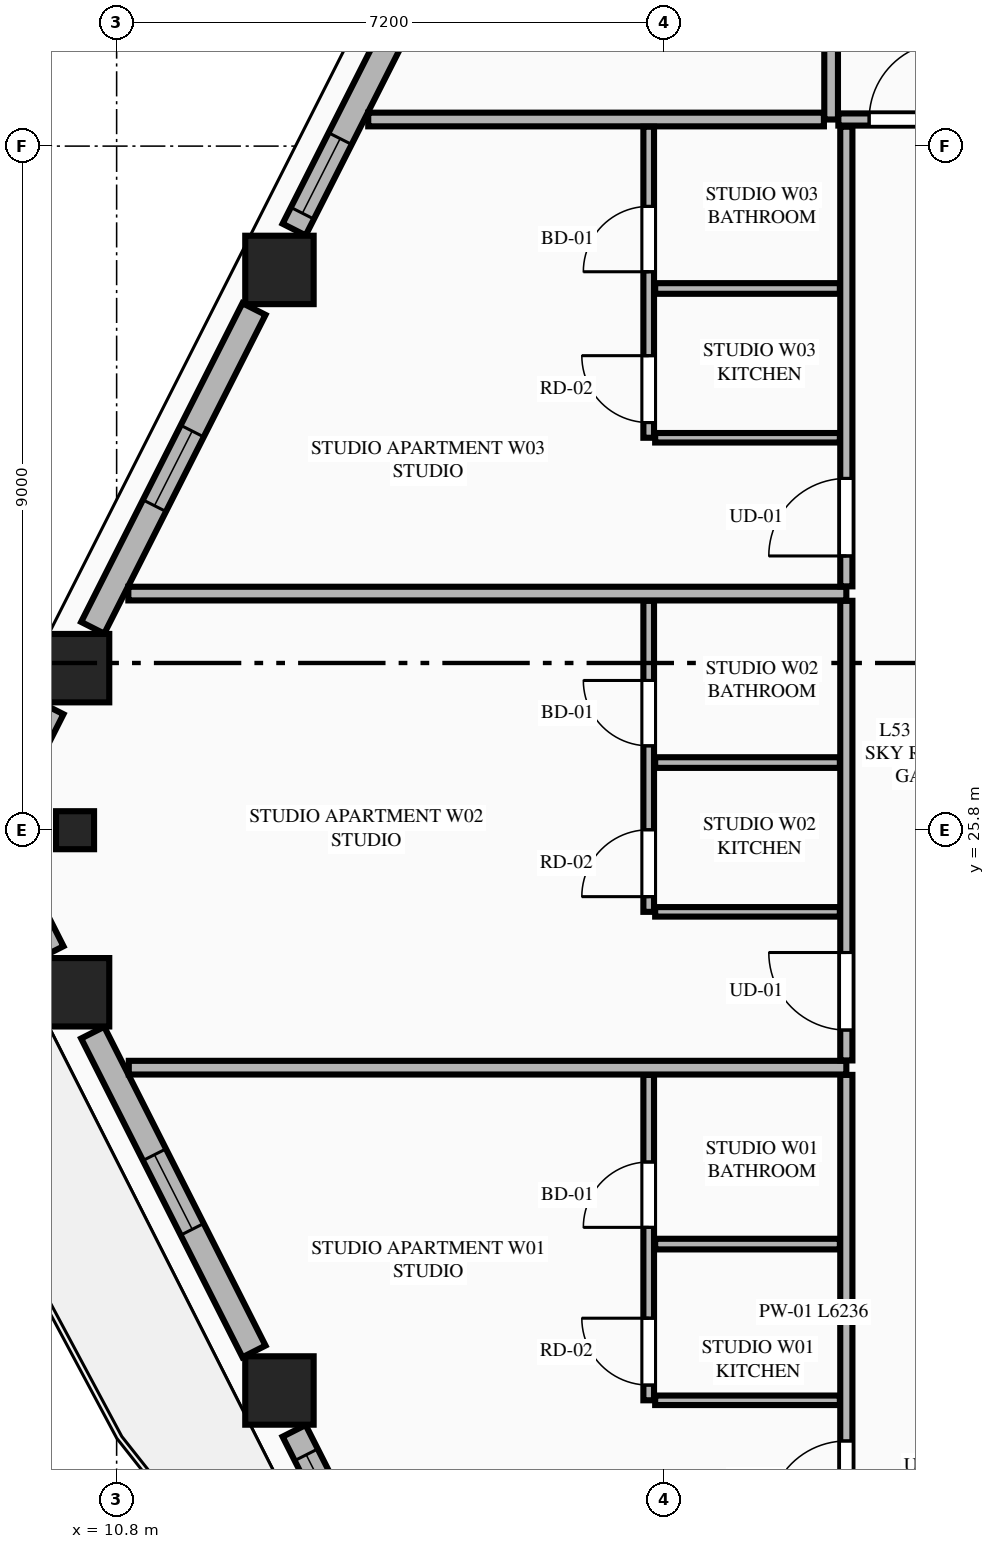
"""IFC4 building model, lengths in metres.
Left out: names, types, materials, properties, quantities, classifications, styles, units other than length and angle.
Written with IfcOpenShell. Run it as: python <this file> out.ifc"""

import sys

from ifc_helpers import new_model, si_unit, direction, frame, frame_2d, origin, origin_2d, place, context, subcontext, project, spatial, rectangle, extrude, element, fill, save


model = new_model("IFC4")
c1 = context("Model", 3, precision=1e-05, world=origin(), true_north=direction((0.0, 1.0)))
c2 = subcontext(c1, "Body", "Model", "MODEL_VIEW")
j1 = project(units=[si_unit("LENGTHUNIT", "METRE"), si_unit("PLANEANGLEUNIT", "RADIAN")], contexts=[c1])
p1 = place(None, origin())
s1 = spatial("IfcSite", under=j1, at=p1, CompositionType="ELEMENT")
p2 = place(p1, origin())
s2 = spatial("IfcBuilding", under=s1, at=p2, CompositionType="ELEMENT")
p3 = place(p2, frame((0.0, 0.0, 200.3)))
s3 = spatial("IfcBuildingStorey", under=s2, at=p3, CompositionType="ELEMENT", Elevation=200.3)
for number, where, z_axis, x_axis in (
    (1, (12.942, 33.171, 0.0), (0.0, 0.0, 1.0), (1.0, 0.0, 0.0)),
    (2, (10.253, 27.932, 0.0), (0.0, 0.0, 1.0), (1.0, 0.0, 0.0)),
    (3, (10.253, 23.668, 0.0), (0.0, 0.0, 1.0), (1.0, 0.0, 0.0)),
    (4, (12.942, 18.429, 0.0), (0.0, 0.0, 1.0), (1.0, 0.0, 0.0)),
):
    element("IfcColumn", number, at=place(p3, frame(where, z_axis=z_axis, x_axis=x_axis)), inside=s3, PredefinedType="COLUMN", context=c2, shape_type="SweptSolid", body=[
        extrude(rectangle(XDim=0.9, YDim=0.9, at=origin_2d()), origin(), (0.0, 0.0, 1.0), 3.55),
    ])
p4 = place(p3, frame((10.253, 25.8, 0.0), z_axis=(0.0, 0.0, 1.0), x_axis=(0.0, -1.0, 0.0)))
e5 = element("IfcColumn", 5, at=p4, inside=s3, PredefinedType="PILASTER", context=c2, shape_type="SweptSolid", body=[
    extrude(rectangle(XDim=0.5, YDim=0.35, at=origin_2d()), origin(), (0.0, 0.0, 1.0), 3.55),
])
p5 = place(p3, frame((15.352, 38.083, 0.0), z_axis=(0.0, 0.0, 1.0), x_axis=(-0.451524246964, -0.89225884944, 0.0)))
e6 = element("IfcWall", 6, at=p5, inside=s3, PredefinedType="STANDARD", context=c2, shape_type="SweptSolid", body=[
    extrude(rectangle(XDim=4.91, YDim=0.34, at=frame_2d((2.455, 0.0))), origin(), (0.0, 0.0, 1.0), 2.883),
])
p6 = place(p5, frame((0.963, 0.0, 0.75)))
e7 = element("IfcOpeningElement", 7, at=p6, cuts=e6, PredefinedType="OPENING", context=c2, shape_type="SweptSolid", body=[
    extrude(rectangle(XDim=1.1, YDim=1.983, at=frame_2d((0.55, 0.991))), frame((0.0, 0.18, 0.0), z_axis=(0.0, -1.0, 0.0), x_axis=(1.0, 0.0, 0.0)), (0.0, 0.0, 1.0), 0.36),
])
p7 = place(p5, frame((3.569, 0.0, 0.75)))
e8 = element("IfcOpeningElement", 8, at=p7, cuts=e6, PredefinedType="OPENING", context=c2, shape_type="SweptSolid", body=[
    extrude(rectangle(XDim=1.1, YDim=1.983, at=frame_2d((0.55, 0.991))), frame((0.0, 0.18, 0.0), z_axis=(0.0, -1.0, 0.0), x_axis=(1.0, 0.0, 0.0)), (0.0, 0.0, 1.0), 0.36),
])
p8 = place(p3, frame((12.607, 32.657, 0.0), z_axis=(0.0, 0.0, 1.0), x_axis=(-0.451426298588, -0.892308409096, 0.0)))
e9 = element("IfcWall", 9, at=p8, inside=s3, PredefinedType="STANDARD", context=c2, shape_type="SweptSolid", body=[
    extrude(rectangle(XDim=4.7, YDim=0.34, at=frame_2d((2.35, 0.0))), origin(), (0.0, 0.0, 1.0), 2.883),
])
p9 = place(p8, frame((1.8, 0.0, 0.75)))
e10 = element("IfcOpeningElement", 10, at=p9, cuts=e9, PredefinedType="OPENING", context=c2, shape_type="SweptSolid", body=[
    extrude(rectangle(XDim=1.1, YDim=1.983, at=frame_2d((0.55, 0.991))), frame((0.0, 0.18, 0.0), z_axis=(0.0, -1.0, 0.0), x_axis=(1.0, 0.0, 0.0)), (0.0, 0.0, 1.0), 0.36),
])
for number, where, z_axis, x_axis in (
    (11, (9.949, 27.403, 0.0), (0.0, 0.0, 1.0), (-0.451, -0.892, 0.0)),
    (12, (9.601, 24.885, 0.0), (0.0, 0.0, 1.0), (0.451, -0.892, 0.0)),
):
    element("IfcWall", number, at=place(p3, frame(where, z_axis=z_axis, x_axis=x_axis)), inside=s3, PredefinedType="STANDARD", context=c2, shape_type="SweptSolid", body=[
        extrude(rectangle(XDim=0.771, YDim=0.34, at=frame_2d((0.385, 0.0))), origin(), (0.0, 0.0, 1.0), 3.35),
    ])
p10 = place(p3, frame((10.485, 23.137, 0.0), z_axis=(0.0, 0.0, 1.0), x_axis=(0.451447222193, -0.892297823361, 0.0)))
e13 = element("IfcWall", 13, at=p10, inside=s3, PredefinedType="STANDARD", context=c2, shape_type="SweptSolid", body=[
    extrude(rectangle(XDim=4.7, YDim=0.34, at=frame_2d((2.35, 0.0))), origin(), (0.0, 0.0, 1.0), 2.883),
])
p11 = place(p10, frame((1.8, 0.0, 0.75)))
e14 = element("IfcOpeningElement", 14, at=p11, cuts=e13, PredefinedType="OPENING", context=c2, shape_type="SweptSolid", body=[
    extrude(rectangle(XDim=1.1, YDim=1.983, at=frame_2d((0.55, 0.991))), frame((0.0, 0.18, 0.0), z_axis=(0.0, -1.0, 0.0), x_axis=(1.0, 0.0, 0.0)), (0.0, 0.0, 1.0), 0.36),
])
p12 = place(p3, frame((13.135, 17.898, 0.0), z_axis=(0.0, 0.0, 1.0), x_axis=(0.451544279509, -0.892248711763, 0.0)))
e15 = element("IfcWall", 15, at=p12, inside=s3, PredefinedType="STANDARD", context=c2, shape_type="SweptSolid", body=[
    extrude(rectangle(XDim=4.91, YDim=0.34, at=frame_2d((2.455, 0.0))), origin(), (0.0, 0.0, 1.0), 2.883),
])
p13 = place(p12, frame((2.954, 0.0, 0.0)))
e16 = element("IfcOpeningElement", 16, at=p13, cuts=e15, PredefinedType="OPENING", context=c2, shape_type="SweptSolid", body=[
    extrude(rectangle(XDim=1.1, YDim=2.25, at=frame_2d((0.55, 1.125))), frame((0.0, 0.18, 0.0), z_axis=(0.0, -1.0, 0.0), x_axis=(1.0, 0.0, 0.0)), (0.0, 0.0, 1.0), 0.36),
])
p14 = place(p12, frame((0.353, 0.0, 0.75)))
e17 = element("IfcOpeningElement", 17, at=p14, cuts=e15, PredefinedType="OPENING", context=c2, shape_type="SweptSolid", body=[
    extrude(rectangle(XDim=1.1, YDim=1.983, at=frame_2d((0.55, 0.991))), frame((0.0, 0.18, 0.0), z_axis=(0.0, -1.0, 0.0), x_axis=(1.0, 0.0, 0.0)), (0.0, 0.0, 1.0), 0.36),
])
p15 = place(p3, frame((20.2, 35.15, 0.0), z_axis=(0.0, 0.0, 1.0), x_axis=(0.0, 1.0, 0.0)))
e18 = element("IfcWall", 18, at=p15, inside=s3, PredefinedType="PARTITIONING", context=c2, shape_type="SweptSolid", body=[
    extrude(rectangle(XDim=10.482, YDim=0.18, at=frame_2d((5.241, 0.0))), origin(), (0.0, 0.0, 1.0), 3.35),
])
p16 = place(p3, frame((20.295, 35.15, 0.0), z_axis=(0.0, 0.0, 1.0), x_axis=(1.0, 0.0, 0.0)))
e19 = element("IfcWall", 19, at=p16, inside=s3, PredefinedType="PARTITIONING", context=c2, shape_type="SweptSolid", body=[
    extrude(rectangle(XDim=15.553, YDim=0.16, at=frame_2d((7.776, 0.0))), origin(), (0.0, 0.0, 1.0), 3.35),
])
p17 = place(p16, frame((0.405, 0.0, 0.0)))
e20 = element("IfcOpeningElement", 20, at=p17, cuts=e19, PredefinedType="OPENING", context=c2, shape_type="SweptSolid", body=[
    extrude(rectangle(XDim=1.02, YDim=2.25, at=frame_2d((0.51, 1.125))), frame((0.0, 0.09, 0.0), z_axis=(0.0, -1.0, 0.0), x_axis=(1.0, 0.0, 0.0)), (0.0, 0.0, 1.0), 0.18),
])
p18 = place(p3, frame((14.11, 35.15, 0.0), z_axis=(0.0, 0.0, 1.0), x_axis=(1.0, 0.0, 0.0)))
e21 = element("IfcWall", 21, at=p18, inside=s3, PredefinedType="PARTITIONING", context=c2, shape_type="SweptSolid", body=[
    extrude(rectangle(XDim=5.995, YDim=0.18, at=frame_2d((2.998, 0.0))), origin(), (0.0, 0.0, 1.0), 3.35),
])
p19 = place(p3, frame((20.4, 16.345, 0.0), z_axis=(0.0, 0.0, 1.0), x_axis=(0.0, 1.0, 0.0)))
e22 = element("IfcWall", 22, at=p19, inside=s3, PredefinedType="PARTITIONING", context=c2, shape_type="SweptSolid", body=[
    extrude(rectangle(XDim=6.236, YDim=0.16, at=frame_2d((3.118, 0.0))), origin(), (0.0, 0.0, 1.0), 3.35),
])
p20 = place(p19, frame((0.4, 0.0, 0.0)))
e23 = element("IfcOpeningElement", 23, at=p20, cuts=e22, PredefinedType="OPENING", context=c2, shape_type="SweptSolid", body=[
    extrude(rectangle(XDim=1.02, YDim=2.25, at=frame_2d((0.51, 1.125))), frame((0.0, 0.09, 0.0), z_axis=(0.0, -1.0, 0.0), x_axis=(1.0, 0.0, 0.0)), (0.0, 0.0, 1.0), 0.18),
])
p21 = place(p3, frame((17.885, 18.3, 0.0), z_axis=(0.0, 0.0, 1.0), x_axis=(1.0, 0.0, 0.0)))
e24 = element("IfcWall", 24, at=p21, inside=s3, PredefinedType="PARTITIONING", context=c2, shape_type="SweptSolid", body=[
    extrude(rectangle(XDim=2.43, YDim=0.125, at=frame_2d((1.215, 0.0))), origin(), (0.0, 0.0, 1.0), 2.807),
])
p22 = place(p3, frame((17.8, 18.3, 0.0), z_axis=(0.0, 0.0, 1.0), x_axis=(0.0, 1.0, 0.0)))
e25 = element("IfcWall", 25, at=p22, inside=s3, PredefinedType="PLUMBINGWALL", context=c2, shape_type="SweptSolid", body=[
    extrude(rectangle(XDim=4.281, YDim=0.14, at=frame_2d((2.141, 0.0))), origin(), (0.0, 0.0, 1.0), 3.35),
])
p23 = place(p22, frame((2.275, 0.0, 0.0)))
e26 = element("IfcOpeningElement", 26, at=p23, cuts=e25, PredefinedType="OPENING", context=c2, shape_type="SweptSolid", body=[
    extrude(rectangle(XDim=0.86, YDim=2.1, at=frame_2d((0.43, 1.05))), frame((0.0, 0.08, 0.0), z_axis=(0.0, -1.0, 0.0), x_axis=(1.0, 0.0, 0.0)), (0.0, 0.0, 1.0), 0.16),
])
p24 = place(p22, frame((0.2, 0.0, 0.0)))
e27 = element("IfcOpeningElement", 27, at=p24, cuts=e25, PredefinedType="OPENING", context=c2, shape_type="SweptSolid", body=[
    extrude(rectangle(XDim=0.88, YDim=2.15, at=frame_2d((0.44, 1.075))), frame((0.0, 0.08, 0.0), z_axis=(0.0, -1.0, 0.0), x_axis=(1.0, 0.0, 0.0)), (0.0, 0.0, 1.0), 0.16),
])
p25 = place(p3, frame((17.885, 20.355, 0.0), z_axis=(0.0, 0.0, 1.0), x_axis=(1.0, 0.0, 0.0)))
e28 = element("IfcWall", 28, at=p25, inside=s3, PredefinedType="PLUMBINGWALL", context=c2, shape_type="SweptSolid", body=[
    extrude(rectangle(XDim=2.43, YDim=0.14, at=frame_2d((1.215, 0.0))), origin(), (0.0, 0.0, 1.0), 3.35),
])
p26 = place(p3, frame((10.96, 22.676, 0.0), z_axis=(0.0, 0.0, 1.0), x_axis=(1.0, 0.0, 0.0)))
e29 = element("IfcWall", 29, at=p26, inside=s3, PredefinedType="PARTITIONING", context=c2, shape_type="SweptSolid", body=[
    extrude(rectangle(XDim=9.44, YDim=0.18, at=frame_2d((4.72, 0.0))), origin(), (0.0, 0.0, 1.0), 3.35),
])
p27 = place(p3, frame((20.4, 22.771, 0.0), z_axis=(0.0, 0.0, 1.0), x_axis=(0.0, 1.0, 0.0)))
e30 = element("IfcWall", 30, at=p27, inside=s3, PredefinedType="PARTITIONING", context=c2, shape_type="SweptSolid", body=[
    extrude(rectangle(XDim=6.047, YDim=0.16, at=frame_2d((3.023, 0.0))), origin(), (0.0, 0.0, 1.0), 3.35),
])
p28 = place(p27, frame((0.4, 0.0, 0.0)))
e31 = element("IfcOpeningElement", 31, at=p28, cuts=e30, PredefinedType="OPENING", context=c2, shape_type="SweptSolid", body=[
    extrude(rectangle(XDim=1.02, YDim=2.25, at=frame_2d((0.51, 1.125))), frame((0.0, 0.09, 0.0), z_axis=(0.0, -1.0, 0.0), x_axis=(1.0, 0.0, 0.0)), (0.0, 0.0, 1.0), 0.18),
])
p29 = place(p3, frame((17.885, 24.726, 0.0), z_axis=(0.0, 0.0, 1.0), x_axis=(1.0, 0.0, 0.0)))
e32 = element("IfcWall", 32, at=p29, inside=s3, PredefinedType="PARTITIONING", context=c2, shape_type="SweptSolid", body=[
    extrude(rectangle(XDim=2.43, YDim=0.125, at=frame_2d((1.215, 0.0))), origin(), (0.0, 0.0, 1.0), 3.35),
])
p30 = place(p3, frame((17.8, 24.726, 0.0), z_axis=(0.0, 0.0, 1.0), x_axis=(0.0, 1.0, 0.0)))
e33 = element("IfcWall", 33, at=p30, inside=s3, PredefinedType="PLUMBINGWALL", context=c2, shape_type="SweptSolid", body=[
    extrude(rectangle(XDim=4.092, YDim=0.14, at=frame_2d((2.046, 0.0))), origin(), (0.0, 0.0, 1.0), 3.35),
])
p31 = place(p30, frame((2.184, 0.0, 0.0)))
e34 = element("IfcOpeningElement", 34, at=p31, cuts=e33, PredefinedType="OPENING", context=c2, shape_type="SweptSolid", body=[
    extrude(rectangle(XDim=0.86, YDim=2.1, at=frame_2d((0.43, 1.05))), frame((0.0, 0.08, 0.0), z_axis=(0.0, -1.0, 0.0), x_axis=(1.0, 0.0, 0.0)), (0.0, 0.0, 1.0), 0.16),
])
p32 = place(p30, frame((0.2, 0.0, 0.0)))
e35 = element("IfcOpeningElement", 35, at=p32, cuts=e33, PredefinedType="OPENING", context=c2, shape_type="SweptSolid", body=[
    extrude(rectangle(XDim=0.88, YDim=2.15, at=frame_2d((0.44, 1.075))), frame((0.0, 0.08, 0.0), z_axis=(0.0, -1.0, 0.0), x_axis=(1.0, 0.0, 0.0)), (0.0, 0.0, 1.0), 0.16),
])
p33 = place(p3, frame((17.885, 26.69, 0.0), z_axis=(0.0, 0.0, 1.0), x_axis=(1.0, 0.0, 0.0)))
e36 = element("IfcWall", 36, at=p33, inside=s3, PredefinedType="PLUMBINGWALL", context=c2, shape_type="SweptSolid", body=[
    extrude(rectangle(XDim=2.43, YDim=0.14, at=frame_2d((1.215, 0.0))), origin(), (0.0, 0.0, 1.0), 3.35),
])
p34 = place(p3, frame((10.954, 28.913, 0.0), z_axis=(0.0, 0.0, 1.0), x_axis=(1.0, 0.0, 0.0)))
e37 = element("IfcWall", 37, at=p34, inside=s3, PredefinedType="PARTITIONING", context=c2, shape_type="SweptSolid", body=[
    extrude(rectangle(XDim=9.446, YDim=0.18, at=frame_2d((4.723, 0.0))), origin(), (0.0, 0.0, 1.0), 3.35),
])
p35 = place(p3, frame((20.4, 29.008, 0.0), z_axis=(0.0, 0.0, 1.0), x_axis=(0.0, 1.0, 0.0)))
e38 = element("IfcWall", 38, at=p35, inside=s3, PredefinedType="PARTITIONING", context=c2, shape_type="SweptSolid", body=[
    extrude(rectangle(XDim=6.047, YDim=0.16, at=frame_2d((3.023, 0.0))), origin(), (0.0, 0.0, 1.0), 3.35),
])
p36 = place(p35, frame((0.4, 0.0, 0.0)))
e39 = element("IfcOpeningElement", 39, at=p36, cuts=e38, PredefinedType="OPENING", context=c2, shape_type="SweptSolid", body=[
    extrude(rectangle(XDim=1.02, YDim=2.25, at=frame_2d((0.51, 1.125))), frame((0.0, 0.09, 0.0), z_axis=(0.0, -1.0, 0.0), x_axis=(1.0, 0.0, 0.0)), (0.0, 0.0, 1.0), 0.18),
])
p37 = place(p3, frame((17.885, 30.963, 0.0), z_axis=(0.0, 0.0, 1.0), x_axis=(1.0, 0.0, 0.0)))
e40 = element("IfcWall", 40, at=p37, inside=s3, PredefinedType="PARTITIONING", context=c2, shape_type="SweptSolid", body=[
    extrude(rectangle(XDim=2.43, YDim=0.125, at=frame_2d((1.215, 0.0))), origin(), (0.0, 0.0, 1.0), 3.35),
])
p38 = place(p3, frame((17.8, 30.963, 0.0), z_axis=(0.0, 0.0, 1.0), x_axis=(0.0, 1.0, 0.0)))
e41 = element("IfcWall", 41, at=p38, inside=s3, PredefinedType="PLUMBINGWALL", context=c2, shape_type="SweptSolid", body=[
    extrude(rectangle(XDim=4.092, YDim=0.14, at=frame_2d((2.046, 0.0))), origin(), (0.0, 0.0, 1.0), 3.35),
])
p39 = place(p38, frame((2.184, 0.0, 0.0)))
e42 = element("IfcOpeningElement", 42, at=p39, cuts=e41, PredefinedType="OPENING", context=c2, shape_type="SweptSolid", body=[
    extrude(rectangle(XDim=0.86, YDim=2.1, at=frame_2d((0.43, 1.05))), frame((0.0, 0.08, 0.0), z_axis=(0.0, -1.0, 0.0), x_axis=(1.0, 0.0, 0.0)), (0.0, 0.0, 1.0), 0.16),
])
p40 = place(p38, frame((0.2, 0.0, 0.0)))
e43 = element("IfcOpeningElement", 43, at=p40, cuts=e41, PredefinedType="OPENING", context=c2, shape_type="SweptSolid", body=[
    extrude(rectangle(XDim=0.88, YDim=2.15, at=frame_2d((0.44, 1.075))), frame((0.0, 0.08, 0.0), z_axis=(0.0, -1.0, 0.0), x_axis=(1.0, 0.0, 0.0)), (0.0, 0.0, 1.0), 0.16),
])
p41 = place(p3, frame((17.885, 32.927, 0.0), z_axis=(0.0, 0.0, 1.0), x_axis=(1.0, 0.0, 0.0)))
e44 = element("IfcWall", 44, at=p41, inside=s3, PredefinedType="PLUMBINGWALL", context=c2, shape_type="SweptSolid", body=[
    extrude(rectangle(XDim=2.43, YDim=0.14, at=frame_2d((1.215, 0.0))), origin(), (0.0, 0.0, 1.0), 3.35),
])
p42 = place(p9, origin())
e45 = element("IfcWindow", 45, at=p42, inside=s3, PartitioningType="SINGLE_PANEL", PredefinedType="WINDOW", context=c2, shape_type="SweptSolid", body=[
    extrude(rectangle(XDim=1.1, YDim=1.983, at=frame_2d((0.55, 0.991))), frame((0.0, 0.03, 0.0), z_axis=(0.0, -1.0, 0.0), x_axis=(1.0, 0.0, 0.0)), (0.0, 0.0, 1.0), 0.06),
])
fill(e10, e45)
p43 = place(p11, origin())
e46 = element("IfcWindow", 46, at=p43, inside=s3, PartitioningType="SINGLE_PANEL", PredefinedType="WINDOW", context=c2, shape_type="SweptSolid", body=[
    extrude(rectangle(XDim=1.1, YDim=1.983, at=frame_2d((0.55, 0.991))), frame((0.0, 0.03, 0.0), z_axis=(0.0, -1.0, 0.0), x_axis=(1.0, 0.0, 0.0)), (0.0, 0.0, 1.0), 0.06),
])
fill(e14, e46)
p44 = place(p17, origin())
e47 = element("IfcDoor", 47, at=p44, inside=s3, OperationType="SINGLE_SWING_RIGHT", PredefinedType="DOOR", context=c2, shape_type="SweptSolid", body=[
    extrude(rectangle(XDim=1.02, YDim=2.25, at=frame_2d((0.51, 1.125))), frame((0.0, 0.025, 0.0), z_axis=(0.0, -1.0, 0.0), x_axis=(1.0, 0.0, 0.0)), (0.0, 0.0, 1.0), 0.05),
])
fill(e20, e47)
p45 = place(p23, origin())
e48 = element("IfcDoor", 48, at=p45, inside=s3, OperationType="SINGLE_SWING_LEFT", PredefinedType="DOOR", context=c2, shape_type="SweptSolid", body=[
    extrude(rectangle(XDim=0.86, YDim=2.1, at=frame_2d((0.43, 1.05))), frame((0.0, 0.025, 0.0), z_axis=(0.0, -1.0, 0.0), x_axis=(1.0, 0.0, 0.0)), (0.0, 0.0, 1.0), 0.05),
])
fill(e26, e48)
p46 = place(p20, origin())
e49 = element("IfcDoor", 49, at=p46, inside=s3, OperationType="SINGLE_SWING_LEFT", PredefinedType="DOOR", context=c2, shape_type="SweptSolid", body=[
    extrude(rectangle(XDim=1.02, YDim=2.25, at=frame_2d((0.51, 1.125))), frame((0.0, 0.025, 0.0), z_axis=(0.0, -1.0, 0.0), x_axis=(1.0, 0.0, 0.0)), (0.0, 0.0, 1.0), 0.05),
])
fill(e23, e49)
p47 = place(p24, origin())
e50 = element("IfcDoor", 50, at=p47, inside=s3, OperationType="SINGLE_SWING_RIGHT", PredefinedType="DOOR", context=c2, shape_type="SweptSolid", body=[
    extrude(rectangle(XDim=0.88, YDim=2.15, at=frame_2d((0.44, 1.075))), frame((0.0, 0.025, 0.0), z_axis=(0.0, -1.0, 0.0), x_axis=(1.0, 0.0, 0.0)), (0.0, 0.0, 1.0), 0.05),
])
fill(e27, e50)
p48 = place(p31, origin())
e51 = element("IfcDoor", 51, at=p48, inside=s3, OperationType="SINGLE_SWING_RIGHT", PredefinedType="DOOR", context=c2, shape_type="SweptSolid", body=[
    extrude(rectangle(XDim=0.86, YDim=2.1, at=frame_2d((0.43, 1.05))), frame((0.0, 0.025, 0.0), z_axis=(0.0, -1.0, 0.0), x_axis=(1.0, 0.0, 0.0)), (0.0, 0.0, 1.0), 0.05),
])
fill(e34, e51)
p49 = place(p28, origin())
e52 = element("IfcDoor", 52, at=p49, inside=s3, OperationType="SINGLE_SWING_RIGHT", PredefinedType="DOOR", context=c2, shape_type="SweptSolid", body=[
    extrude(rectangle(XDim=1.02, YDim=2.25, at=frame_2d((0.51, 1.125))), frame((0.0, 0.025, 0.0), z_axis=(0.0, -1.0, 0.0), x_axis=(1.0, 0.0, 0.0)), (0.0, 0.0, 1.0), 0.05),
])
fill(e31, e52)
p50 = place(p32, origin())
e53 = element("IfcDoor", 53, at=p50, inside=s3, OperationType="SINGLE_SWING_LEFT", PredefinedType="DOOR", context=c2, shape_type="SweptSolid", body=[
    extrude(rectangle(XDim=0.88, YDim=2.15, at=frame_2d((0.44, 1.075))), frame((0.0, 0.025, 0.0), z_axis=(0.0, -1.0, 0.0), x_axis=(1.0, 0.0, 0.0)), (0.0, 0.0, 1.0), 0.05),
])
fill(e35, e53)
p51 = place(p39, origin())
e54 = element("IfcDoor", 54, at=p51, inside=s3, OperationType="SINGLE_SWING_LEFT", PredefinedType="DOOR", context=c2, shape_type="SweptSolid", body=[
    extrude(rectangle(XDim=0.86, YDim=2.1, at=frame_2d((0.43, 1.05))), frame((0.0, 0.025, 0.0), z_axis=(0.0, -1.0, 0.0), x_axis=(1.0, 0.0, 0.0)), (0.0, 0.0, 1.0), 0.05),
])
fill(e42, e54)
p52 = place(p36, origin())
e55 = element("IfcDoor", 55, at=p52, inside=s3, OperationType="SINGLE_SWING_LEFT", PredefinedType="DOOR", context=c2, shape_type="SweptSolid", body=[
    extrude(rectangle(XDim=1.02, YDim=2.25, at=frame_2d((0.51, 1.125))), frame((0.0, 0.025, 0.0), z_axis=(0.0, -1.0, 0.0), x_axis=(1.0, 0.0, 0.0)), (0.0, 0.0, 1.0), 0.05),
])
fill(e39, e55)
p53 = place(p40, origin())
e56 = element("IfcDoor", 56, at=p53, inside=s3, OperationType="SINGLE_SWING_RIGHT", PredefinedType="DOOR", context=c2, shape_type="SweptSolid", body=[
    extrude(rectangle(XDim=0.88, YDim=2.15, at=frame_2d((0.44, 1.075))), frame((0.0, 0.025, 0.0), z_axis=(0.0, -1.0, 0.0), x_axis=(1.0, 0.0, 0.0)), (0.0, 0.0, 1.0), 0.05),
])
fill(e43, e56)
p54 = place(p7, origin())
e57 = element("IfcWindow", 57, at=p54, inside=s3, PartitioningType="SINGLE_PANEL", PredefinedType="WINDOW", context=c2, shape_type="SweptSolid", body=[
    extrude(rectangle(XDim=1.1, YDim=1.983, at=frame_2d((0.55, 0.991))), frame((0.0, 0.03, 0.0), z_axis=(0.0, -1.0, 0.0), x_axis=(1.0, 0.0, 0.0)), (0.0, 0.0, 1.0), 0.06),
])
fill(e8, e57)
p55 = place(p14, origin())
e58 = element("IfcWindow", 58, at=p55, inside=s3, PartitioningType="SINGLE_PANEL", PredefinedType="WINDOW", context=c2, shape_type="SweptSolid", body=[
    extrude(rectangle(XDim=1.1, YDim=1.983, at=frame_2d((0.55, 0.991))), frame((0.0, 0.03, 0.0), z_axis=(0.0, -1.0, 0.0), x_axis=(1.0, 0.0, 0.0)), (0.0, 0.0, 1.0), 0.06),
])
fill(e17, e58)
save(model, sys.argv[1])
